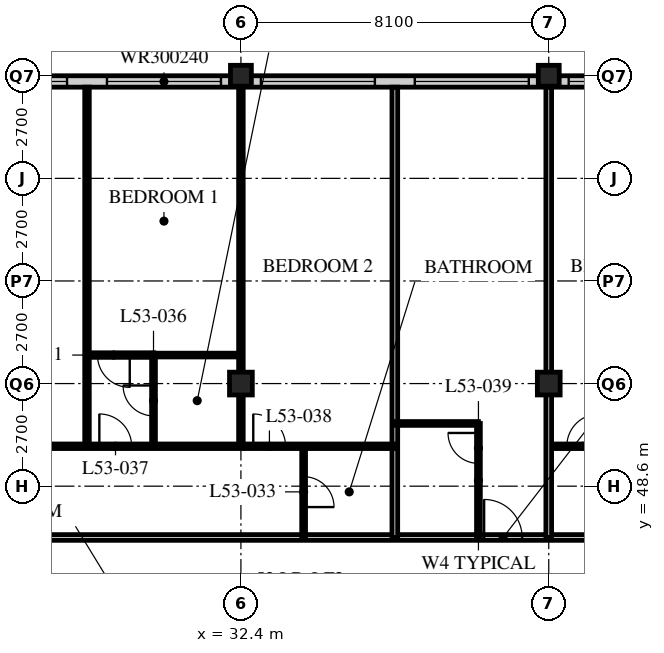
"""IFC4 building model, lengths in metres.
Left out: names, types, materials, properties, quantities, classifications, styles, units other than length and angle.
Written with IfcOpenShell. Run it as: python <this file> out.ifc"""

import sys

from ifc_helpers import new_model, si_unit, direction, frame, frame_2d, origin, origin_2d, place, context, subcontext, project, spatial, rectangle, hollow_rectangle, extrude, element, fill, save


model = new_model("IFC4")
c1 = context("Model", 3, precision=1e-05, world=origin(), true_north=direction((0.0, 1.0)))
c2 = subcontext(c1, "Body", "Model", "MODEL_VIEW")
j1 = project(units=[si_unit("LENGTHUNIT", "METRE"), si_unit("PLANEANGLEUNIT", "RADIAN")], contexts=[c1])
p1 = place(None, origin())
s1 = spatial("IfcSite", under=j1, at=p1, CompositionType="ELEMENT")
p2 = place(p1, origin())
s2 = spatial("IfcBuilding", under=s1, at=p2, CompositionType="ELEMENT")
p3 = place(p2, frame((0.0, 0.0, 206.4)))
s3 = spatial("IfcBuildingStorey", under=s2, at=p3, CompositionType="ELEMENT", Elevation=206.4)
p4 = place(p3, frame((32.4, 51.3, 0.0), z_axis=(0.0, 0.0, 1.0), x_axis=(1.0, 0.0, 0.0)))
e1 = element("IfcColumn", 1, at=p4, inside=s3, PredefinedType="COLUMN", context=c2, shape_type="SweptSolid", body=[
    extrude(hollow_rectangle(XDim=0.6, YDim=0.6, WallThickness=0.05, at=origin_2d()), origin(), (0.0, 0.0, 1.0), 3.6),
])
p5 = place(p3, frame((32.4, 59.4, 0.0), z_axis=(0.0, 0.0, 1.0), x_axis=(1.0, 0.0, 0.0)))
e2 = element("IfcColumn", 2, at=p5, inside=s3, PredefinedType="COLUMN", context=c2, shape_type="SweptSolid", body=[
    extrude(hollow_rectangle(XDim=0.55, YDim=0.55, WallThickness=0.045, at=origin_2d()), origin(), (0.0, 0.0, 1.0), 3.6),
])
p6 = place(p3, frame((40.5, 51.3, 0.0), z_axis=(0.0, 0.0, 1.0), x_axis=(1.0, 0.0, 0.0)))
e3 = element("IfcColumn", 3, at=p6, inside=s3, PredefinedType="COLUMN", context=c2, shape_type="SweptSolid", body=[
    extrude(hollow_rectangle(XDim=0.6, YDim=0.6, WallThickness=0.05, at=origin_2d()), origin(), (0.0, 0.0, 1.0), 3.6),
])
p7 = place(p3, frame((40.5, 59.4, 0.0), z_axis=(0.0, 0.0, 1.0), x_axis=(1.0, 0.0, 0.0)))
e4 = element("IfcColumn", 4, at=p7, inside=s3, PredefinedType="COLUMN", context=c2, shape_type="SweptSolid", body=[
    extrude(hollow_rectangle(XDim=0.55, YDim=0.55, WallThickness=0.045, at=origin_2d()), origin(), (0.0, 0.0, 1.0), 3.6),
])
p8 = place(p3, frame((48.3, 59.25, 0.0), z_axis=(0.0, 0.0, 1.0), x_axis=(-1.0, 0.0, 0.0)))
e5 = element("IfcWall", 5, at=p8, inside=s3, PredefinedType="SOLIDWALL", context=c2, shape_type="SweptSolid", body=[
    extrude(rectangle(XDim=40.2, YDim=0.3, at=frame_2d((20.1, 0.0))), origin(), (0.0, 0.0, 1.0), 3.39),
])
p9 = place(p8, frame((0.225, 0.0, 0.6)))
e6 = element("IfcOpeningElement", 6, at=p9, cuts=e5, PredefinedType="OPENING", context=c2, shape_type="SweptSolid", body=[
    extrude(rectangle(XDim=3.0, YDim=2.4, at=frame_2d((1.5, 1.2))), frame((0.0, 0.16, 0.0), z_axis=(0.0, -1.0, 0.0), x_axis=(1.0, 0.0, 0.0)), (0.0, 0.0, 1.0), 0.32),
])
p10 = place(p8, frame((4.275, 0.0, 0.6)))
e7 = element("IfcOpeningElement", 7, at=p10, cuts=e5, PredefinedType="OPENING", context=c2, shape_type="SweptSolid", body=[
    extrude(rectangle(XDim=3.0, YDim=2.4, at=frame_2d((1.5, 1.2))), frame((0.0, 0.16, 0.0), z_axis=(0.0, -1.0, 0.0), x_axis=(1.0, 0.0, 0.0)), (0.0, 0.0, 1.0), 0.32),
])
p11 = place(p8, frame((8.325, 0.0, 0.6)))
e8 = element("IfcOpeningElement", 8, at=p11, cuts=e5, PredefinedType="OPENING", context=c2, shape_type="SweptSolid", body=[
    extrude(rectangle(XDim=3.0, YDim=2.4, at=frame_2d((1.5, 1.2))), frame((0.0, 0.16, 0.0), z_axis=(0.0, -1.0, 0.0), x_axis=(1.0, 0.0, 0.0)), (0.0, 0.0, 1.0), 0.32),
])
p12 = place(p8, frame((12.375, 0.0, 0.6)))
e9 = element("IfcOpeningElement", 9, at=p12, cuts=e5, PredefinedType="OPENING", context=c2, shape_type="SweptSolid", body=[
    extrude(rectangle(XDim=3.0, YDim=2.4, at=frame_2d((1.5, 1.2))), frame((0.0, 0.16, 0.0), z_axis=(0.0, -1.0, 0.0), x_axis=(1.0, 0.0, 0.0)), (0.0, 0.0, 1.0), 0.32),
])
p13 = place(p8, frame((16.425, 0.0, 0.6)))
e10 = element("IfcOpeningElement", 10, at=p13, cuts=e5, PredefinedType="OPENING", context=c2, shape_type="SweptSolid", body=[
    extrude(rectangle(XDim=3.0, YDim=2.4, at=frame_2d((1.5, 1.2))), frame((0.0, 0.16, 0.0), z_axis=(0.0, -1.0, 0.0), x_axis=(1.0, 0.0, 0.0)), (0.0, 0.0, 1.0), 0.32),
])
p14 = place(p8, frame((20.475, 0.0, 0.6)))
e11 = element("IfcOpeningElement", 11, at=p14, cuts=e5, PredefinedType="OPENING", context=c2, shape_type="SweptSolid", body=[
    extrude(rectangle(XDim=3.0, YDim=2.4, at=frame_2d((1.5, 1.2))), frame((0.0, 0.16, 0.0), z_axis=(0.0, -1.0, 0.0), x_axis=(1.0, 0.0, 0.0)), (0.0, 0.0, 1.0), 0.32),
])
p15 = place(p8, frame((24.525, 0.0, 0.6)))
e12 = element("IfcOpeningElement", 12, at=p15, cuts=e5, PredefinedType="OPENING", context=c2, shape_type="SweptSolid", body=[
    extrude(rectangle(XDim=3.0, YDim=2.4, at=frame_2d((1.5, 1.2))), frame((0.0, 0.16, 0.0), z_axis=(0.0, -1.0, 0.0), x_axis=(1.0, 0.0, 0.0)), (0.0, 0.0, 1.0), 0.32),
])
p16 = place(p8, frame((28.575, 0.0, 0.6)))
e13 = element("IfcOpeningElement", 13, at=p16, cuts=e5, PredefinedType="OPENING", context=c2, shape_type="SweptSolid", body=[
    extrude(rectangle(XDim=3.0, YDim=2.4, at=frame_2d((1.5, 1.2))), frame((0.0, 0.16, 0.0), z_axis=(0.0, -1.0, 0.0), x_axis=(1.0, 0.0, 0.0)), (0.0, 0.0, 1.0), 0.32),
])
p17 = place(p8, frame((32.625, 0.0, 0.6)))
e14 = element("IfcOpeningElement", 14, at=p17, cuts=e5, PredefinedType="OPENING", context=c2, shape_type="SweptSolid", body=[
    extrude(rectangle(XDim=3.0, YDim=2.4, at=frame_2d((1.5, 1.2))), frame((0.0, 0.16, 0.0), z_axis=(0.0, -1.0, 0.0), x_axis=(1.0, 0.0, 0.0)), (0.0, 0.0, 1.0), 0.32),
])
p18 = place(p8, frame((36.675, 0.0, 0.6)))
e15 = element("IfcOpeningElement", 15, at=p18, cuts=e5, PredefinedType="OPENING", context=c2, shape_type="SweptSolid", body=[
    extrude(rectangle(XDim=3.0, YDim=2.4, at=frame_2d((1.5, 1.2))), frame((0.0, 0.16, 0.0), z_axis=(0.0, -1.0, 0.0), x_axis=(1.0, 0.0, 0.0)), (0.0, 0.0, 1.0), 0.32),
])
p19 = place(p3, frame((8.1, 47.25, 0.0), z_axis=(0.0, 0.0, 1.0), x_axis=(1.0, 0.0, 0.0)))
e16 = element("IfcWall", 16, at=p19, inside=s3, PredefinedType="PARTITIONING", context=c2, shape_type="SweptSolid", body=[
    extrude(rectangle(XDim=36.45, YDim=0.15, at=frame_2d((18.225, 0.0))), origin(), (0.0, 0.0, 1.0), 3.39),
])
p20 = place(p19, frame((4.45, 0.0, 0.0)))
e17 = element("IfcOpeningElement", 17, at=p20, cuts=e16, PredefinedType="OPENING", context=c2, shape_type="SweptSolid", body=[
    extrude(rectangle(XDim=1.0, YDim=2.1, at=frame_2d((0.5, 1.05))), frame((0.0, 0.085, 0.0), z_axis=(0.0, -1.0, 0.0), x_axis=(1.0, 0.0, 0.0)), (0.0, 0.0, 1.0), 0.17),
])
p21 = place(p19, frame((12.55, 0.0, 0.0)))
e18 = element("IfcOpeningElement", 18, at=p21, cuts=e16, PredefinedType="OPENING", context=c2, shape_type="SweptSolid", body=[
    extrude(rectangle(XDim=1.0, YDim=2.1, at=frame_2d((0.5, 1.05))), frame((0.0, 0.085, 0.0), z_axis=(0.0, -1.0, 0.0), x_axis=(1.0, 0.0, 0.0)), (0.0, 0.0, 1.0), 0.17),
])
p22 = place(p19, frame((30.7, 0.0, 0.0)))
e19 = element("IfcOpeningElement", 19, at=p22, cuts=e16, PredefinedType="OPENING", context=c2, shape_type="SweptSolid", body=[
    extrude(rectangle(XDim=1.0, YDim=2.1, at=frame_2d((0.5, 1.05))), frame((0.0, 0.085, 0.0), z_axis=(0.0, -1.0, 0.0), x_axis=(1.0, 0.0, 0.0)), (0.0, 0.0, 1.0), 0.17),
])
p23 = place(p19, frame((33.925, 0.0, 0.0)))
e20 = element("IfcOpeningElement", 20, at=p23, cuts=e16, PredefinedType="OPENING", context=c2, shape_type="SweptSolid", body=[
    extrude(rectangle(XDim=1.0, YDim=2.1, at=frame_2d((0.5, 1.05))), frame((0.0, 0.085, 0.0), z_axis=(0.0, -1.0, 0.0), x_axis=(1.0, 0.0, 0.0)), (0.0, 0.0, 1.0), 0.17),
])
p24 = place(p19, frame((1.525, 0.0, 0.0)))
e21 = element("IfcOpeningElement", 21, at=p24, cuts=e16, PredefinedType="OPENING", context=c2, shape_type="SweptSolid", body=[
    extrude(rectangle(XDim=1.0, YDim=2.1, at=frame_2d((0.5, 1.05))), frame((0.0, 0.085, 0.0), z_axis=(0.0, -1.0, 0.0), x_axis=(1.0, 0.0, 0.0)), (0.0, 0.0, 1.0), 0.17),
])
p25 = place(p3, frame((34.05, 47.25, 0.0), z_axis=(0.0, 0.0, 1.0), x_axis=(0.0, 1.0, 0.0)))
e22 = element("IfcWall", 22, at=p25, inside=s3, PredefinedType="PARTITIONING", context=c2, shape_type="SweptSolid", body=[
    extrude(rectangle(XDim=2.4, YDim=0.1, at=frame_2d((1.2, 0.0))), origin(), (0.0, 0.0, 1.0), 3.39),
])
p26 = place(p25, frame((0.8, 0.0, 0.0)))
e23 = element("IfcOpeningElement", 23, at=p26, cuts=e22, PredefinedType="OPENING", context=c2, shape_type="SweptSolid", body=[
    extrude(rectangle(XDim=0.8, YDim=2.1, at=frame_2d((0.4, 1.05))), frame((0.0, 0.06, 0.0), z_axis=(0.0, -1.0, 0.0), x_axis=(1.0, 0.0, 0.0)), (0.0, 0.0, 1.0), 0.12),
])
p27 = place(p3, frame((30.1, 49.65, 0.0), z_axis=(0.0, 0.0, 1.0), x_axis=(0.0, 1.0, 0.0)))
e24 = element("IfcWall", 24, at=p27, inside=s3, PredefinedType="PARTITIONING", context=c2, shape_type="SweptSolid", body=[
    extrude(rectangle(XDim=2.4, YDim=0.1, at=frame_2d((1.2, 0.0))), origin(), (0.0, 0.0, 1.0), 3.39),
])
p28 = place(p27, frame((0.8, 0.0, 0.0)))
e25 = element("IfcOpeningElement", 25, at=p28, cuts=e24, PredefinedType="OPENING", context=c2, shape_type="SweptSolid", body=[
    extrude(rectangle(XDim=0.8, YDim=2.1, at=frame_2d((0.4, 1.05))), frame((0.0, 0.06, 0.0), z_axis=(0.0, -1.0, 0.0), x_axis=(1.0, 0.0, 0.0)), (0.0, 0.0, 1.0), 0.12),
])
p29 = place(p3, frame((30.1, 52.05, 0.0), z_axis=(0.0, 0.0, 1.0), x_axis=(1.0, 0.0, 0.0)))
e26 = element("IfcWall", 26, at=p29, inside=s3, PredefinedType="PARTITIONING", context=c2, shape_type="SweptSolid", body=[
    extrude(rectangle(XDim=2.3, YDim=0.1, at=frame_2d((1.15, 0.0))), origin(), (0.0, 0.0, 1.0), 3.39),
])
p30 = place(p3, frame((28.35, 49.65, 0.0), z_axis=(0.0, 0.0, 1.0), x_axis=(0.0, 1.0, 0.0)))
e27 = element("IfcWall", 27, at=p30, inside=s3, PredefinedType="PARTITIONING", context=c2, shape_type="SweptSolid", body=[
    extrude(rectangle(XDim=9.45, YDim=0.12, at=frame_2d((4.725, 0.0))), origin(), (0.0, 0.0, 1.0), 3.39),
])
p31 = place(p3, frame((32.4, 49.65, 0.0), z_axis=(0.0, 0.0, 1.0), x_axis=(0.0, 1.0, 0.0)))
e28 = element("IfcWall", 28, at=p31, inside=s3, PredefinedType="PARTITIONING", context=c2, shape_type="SweptSolid", body=[
    extrude(rectangle(XDim=9.45, YDim=0.12, at=frame_2d((4.725, 0.0))), origin(), (0.0, 0.0, 1.0), 2.778),
])
p32 = place(p3, frame((36.45, 47.25, 0.0), z_axis=(0.0, 0.0, 1.0), x_axis=(0.0, 1.0, 0.0)))
e29 = element("IfcWall", 29, at=p32, inside=s3, PredefinedType="PARTITIONING", context=c2, shape_type="SweptSolid", body=[
    extrude(rectangle(XDim=11.85, YDim=0.15, at=frame_2d((5.925, 0.0))), origin(), (0.0, 0.0, 1.0), 3.39),
])
p33 = place(p3, frame((36.45, 50.25, 0.0), z_axis=(0.0, 0.0, 1.0), x_axis=(1.0, 0.0, 0.0)))
e30 = element("IfcWall", 30, at=p33, inside=s3, PredefinedType="PARTITIONING", context=c2, shape_type="SweptSolid", body=[
    extrude(rectangle(XDim=2.2, YDim=0.1, at=frame_2d((1.1, 0.0))), origin(), (0.0, 0.0, 1.0), 3.39),
])
p34 = place(p3, frame((38.65, 47.25, 0.0), z_axis=(0.0, 0.0, 1.0), x_axis=(0.0, 1.0, 0.0)))
e31 = element("IfcWall", 31, at=p34, inside=s3, PredefinedType="PARTITIONING", context=c2, shape_type="SweptSolid", body=[
    extrude(rectangle(XDim=3.0, YDim=0.1, at=frame_2d((1.5, 0.0))), origin(), (0.0, 0.0, 1.0), 3.39),
])
p35 = place(p34, frame((1.95, 0.0, 0.0)))
e32 = element("IfcOpeningElement", 32, at=p35, cuts=e31, PredefinedType="OPENING", context=c2, shape_type="SweptSolid", body=[
    extrude(rectangle(XDim=0.8, YDim=2.1, at=frame_2d((0.4, 1.05))), frame((0.0, 0.06, 0.0), z_axis=(0.0, -1.0, 0.0), x_axis=(1.0, 0.0, 0.0)), (0.0, 0.0, 1.0), 0.12),
])
p36 = place(p3, frame((40.5, 49.65, 0.0), z_axis=(0.0, 0.0, 1.0), x_axis=(1.0, 0.0, 0.0)))
e33 = element("IfcWall", 33, at=p36, inside=s3, PredefinedType="PARTITIONING", context=c2, shape_type="SweptSolid", body=[
    extrude(rectangle(XDim=8.05, YDim=0.12, at=frame_2d((4.025, 0.0))), origin(), (0.0, 0.0, 1.0), 3.39),
])
p37 = place(p36, frame((0.475, 0.0, 0.0)))
e34 = element("IfcOpeningElement", 34, at=p37, cuts=e33, PredefinedType="OPENING", context=c2, shape_type="SweptSolid", body=[
    extrude(rectangle(XDim=0.85, YDim=2.1, at=frame_2d((0.425, 1.05))), frame((0.0, 0.07, 0.0), z_axis=(0.0, -1.0, 0.0), x_axis=(1.0, 0.0, 0.0)), (0.0, 0.0, 1.0), 0.14),
])
p38 = place(p36, frame((4.325, 0.0, 0.0)))
e35 = element("IfcOpeningElement", 35, at=p38, cuts=e33, PredefinedType="OPENING", context=c2, shape_type="SweptSolid", body=[
    extrude(rectangle(XDim=0.85, YDim=2.1, at=frame_2d((0.425, 1.05))), frame((0.0, 0.07, 0.0), z_axis=(0.0, -1.0, 0.0), x_axis=(1.0, 0.0, 0.0)), (0.0, 0.0, 1.0), 0.14),
])
p39 = place(p3, frame((40.5, 47.25, 0.0), z_axis=(0.0, 0.0, 1.0), x_axis=(0.0, 1.0, 0.0)))
e36 = element("IfcWall", 36, at=p39, inside=s3, PredefinedType="PARTITIONING", context=c2, shape_type="SweptSolid", body=[
    extrude(rectangle(XDim=11.85, YDim=0.15, at=frame_2d((5.925, 0.0))), origin(), (0.0, 0.0, 1.0), 2.778),
])
p40 = place(p3, frame((4.1, 49.65, 0.0), z_axis=(0.0, 0.0, 1.0), x_axis=(1.0, 0.0, 0.0)))
e37 = element("IfcWall", 37, at=p40, inside=s3, PredefinedType="PARTITIONING", context=c2, shape_type="SweptSolid", body=[
    extrude(rectangle(XDim=32.35, YDim=0.12, at=frame_2d((16.175, 0.0))), origin(), (0.0, 0.0, 1.0), 3.39),
])
p41 = place(p40, frame((9.025, 0.0, 0.0)))
e38 = element("IfcOpeningElement", 38, at=p41, cuts=e37, PredefinedType="OPENING", context=c2, shape_type="SweptSolid", body=[
    extrude(rectangle(XDim=0.85, YDim=2.1, at=frame_2d((0.425, 1.05))), frame((0.0, 0.07, 0.0), z_axis=(0.0, -1.0, 0.0), x_axis=(1.0, 0.0, 0.0)), (0.0, 0.0, 1.0), 0.14),
])
p42 = place(p40, frame((12.425, 0.0, 0.0)))
e39 = element("IfcOpeningElement", 39, at=p42, cuts=e37, PredefinedType="OPENING", context=c2, shape_type="SweptSolid", body=[
    extrude(rectangle(XDim=0.85, YDim=2.1, at=frame_2d((0.425, 1.05))), frame((0.0, 0.07, 0.0), z_axis=(0.0, -1.0, 0.0), x_axis=(1.0, 0.0, 0.0)), (0.0, 0.0, 1.0), 0.14),
])
p43 = place(p40, frame((17.125, 0.0, 0.0)))
e40 = element("IfcOpeningElement", 40, at=p43, cuts=e37, PredefinedType="OPENING", context=c2, shape_type="SweptSolid", body=[
    extrude(rectangle(XDim=0.85, YDim=2.1, at=frame_2d((0.425, 1.05))), frame((0.0, 0.07, 0.0), z_axis=(0.0, -1.0, 0.0), x_axis=(1.0, 0.0, 0.0)), (0.0, 0.0, 1.0), 0.14),
])
p44 = place(p40, frame((24.575, 0.0, 0.0)))
e41 = element("IfcOpeningElement", 41, at=p44, cuts=e37, PredefinedType="OPENING", context=c2, shape_type="SweptSolid", body=[
    extrude(rectangle(XDim=0.85, YDim=2.1, at=frame_2d((0.425, 1.05))), frame((0.0, 0.07, 0.0), z_axis=(0.0, -1.0, 0.0), x_axis=(1.0, 0.0, 0.0)), (0.0, 0.0, 1.0), 0.14),
])
p45 = place(p40, frame((28.625, 0.0, 0.0)))
e42 = element("IfcOpeningElement", 42, at=p45, cuts=e37, PredefinedType="OPENING", context=c2, shape_type="SweptSolid", body=[
    extrude(rectangle(XDim=0.85, YDim=2.1, at=frame_2d((0.425, 1.05))), frame((0.0, 0.07, 0.0), z_axis=(0.0, -1.0, 0.0), x_axis=(1.0, 0.0, 0.0)), (0.0, 0.0, 1.0), 0.14),
])
p46 = place(p40, frame((6.725, 0.0, 0.0)))
e43 = element("IfcOpeningElement", 43, at=p46, cuts=e37, PredefinedType="OPENING", context=c2, shape_type="SweptSolid", body=[
    extrude(rectangle(XDim=0.85, YDim=2.1, at=frame_2d((0.425, 1.05))), frame((0.0, 0.07, 0.0), z_axis=(0.0, -1.0, 0.0), x_axis=(1.0, 0.0, 0.0)), (0.0, 0.0, 1.0), 0.14),
])
p47 = place(p40, frame((2.875, 0.0, 0.0)))
e44 = element("IfcOpeningElement", 44, at=p47, cuts=e37, PredefinedType="OPENING", context=c2, shape_type="SweptSolid", body=[
    extrude(rectangle(XDim=0.85, YDim=2.1, at=frame_2d((0.425, 1.05))), frame((0.0, 0.07, 0.0), z_axis=(0.0, -1.0, 0.0), x_axis=(1.0, 0.0, 0.0)), (0.0, 0.0, 1.0), 0.14),
])
p48 = place(p3, frame((28.35, 52.05, 0.0), z_axis=(0.0, 0.0, 1.0), x_axis=(1.0, 0.0, 0.0)))
e45 = element("IfcWall", 45, at=p48, inside=s3, PredefinedType="PARTITIONING", context=c2, shape_type="SweptSolid", body=[
    extrude(rectangle(XDim=1.76, YDim=0.12, at=frame_2d((0.88, 0.0))), origin(), (0.0, 0.0, 1.0), 3.39),
])
p49 = place(p48, frame((0.275, 0.0, 0.0)))
e46 = element("IfcOpeningElement", 46, at=p49, cuts=e45, PredefinedType="OPENING", context=c2, shape_type="SweptSolid", body=[
    extrude(rectangle(XDim=0.85, YDim=2.1, at=frame_2d((0.425, 1.05))), frame((0.0, 0.07, 0.0), z_axis=(0.0, -1.0, 0.0), x_axis=(1.0, 0.0, 0.0)), (0.0, 0.0, 1.0), 0.14),
])
p50 = place(p10, origin())
e47 = element("IfcWindow", 47, at=p50, inside=s3, PartitioningType="SINGLE_PANEL", PredefinedType="WINDOW", context=c2, shape_type="SweptSolid", body=[
    extrude(rectangle(XDim=3.0, YDim=2.4, at=frame_2d((1.5, 1.2))), frame((0.0, 0.03, 0.0), z_axis=(0.0, -1.0, 0.0), x_axis=(1.0, 0.0, 0.0)), (0.0, 0.0, 1.0), 0.06),
])
fill(e7, e47)
p51 = place(p11, origin())
e48 = element("IfcWindow", 48, at=p51, inside=s3, PartitioningType="SINGLE_PANEL", PredefinedType="WINDOW", context=c2, shape_type="SweptSolid", body=[
    extrude(rectangle(XDim=3.0, YDim=2.4, at=frame_2d((1.5, 1.2))), frame((0.0, 0.03, 0.0), z_axis=(0.0, -1.0, 0.0), x_axis=(1.0, 0.0, 0.0)), (0.0, 0.0, 1.0), 0.06),
])
fill(e8, e48)
p52 = place(p12, origin())
e49 = element("IfcWindow", 49, at=p52, inside=s3, PartitioningType="SINGLE_PANEL", PredefinedType="WINDOW", context=c2, shape_type="SweptSolid", body=[
    extrude(rectangle(XDim=3.0, YDim=2.4, at=frame_2d((1.5, 1.2))), frame((0.0, 0.03, 0.0), z_axis=(0.0, -1.0, 0.0), x_axis=(1.0, 0.0, 0.0)), (0.0, 0.0, 1.0), 0.06),
])
fill(e9, e49)
p53 = place(p13, origin())
e50 = element("IfcWindow", 50, at=p53, inside=s3, PartitioningType="SINGLE_PANEL", PredefinedType="WINDOW", context=c2, shape_type="SweptSolid", body=[
    extrude(rectangle(XDim=3.0, YDim=2.4, at=frame_2d((1.5, 1.2))), frame((0.0, 0.03, 0.0), z_axis=(0.0, -1.0, 0.0), x_axis=(1.0, 0.0, 0.0)), (0.0, 0.0, 1.0), 0.06),
])
fill(e10, e50)
p54 = place(p14, origin())
e51 = element("IfcWindow", 51, at=p54, inside=s3, PartitioningType="SINGLE_PANEL", PredefinedType="WINDOW", context=c2, shape_type="SweptSolid", body=[
    extrude(rectangle(XDim=3.0, YDim=2.4, at=frame_2d((1.5, 1.2))), frame((0.0, 0.03, 0.0), z_axis=(0.0, -1.0, 0.0), x_axis=(1.0, 0.0, 0.0)), (0.0, 0.0, 1.0), 0.06),
])
fill(e11, e51)
p55 = place(p26, origin())
e52 = element("IfcDoor", 52, at=p55, inside=s3, OperationType="SINGLE_SWING_RIGHT", PredefinedType="DOOR", context=c2, shape_type="SweptSolid", body=[
    extrude(rectangle(XDim=0.8, YDim=2.1, at=frame_2d((0.4, 1.05))), frame((0.0, 0.025, 0.0), z_axis=(0.0, -1.0, 0.0), x_axis=(1.0, 0.0, 0.0)), (0.0, 0.0, 1.0), 0.05),
])
fill(e23, e52)
p56 = place(p28, origin())
e53 = element("IfcDoor", 53, at=p56, inside=s3, OperationType="SINGLE_SWING_RIGHT", PredefinedType="DOOR", context=c2, shape_type="SweptSolid", body=[
    extrude(rectangle(XDim=0.8, YDim=2.1, at=frame_2d((0.4, 1.05))), frame((0.0, 0.025, 0.0), z_axis=(0.0, -1.0, 0.0), x_axis=(1.0, 0.0, 0.0)), (0.0, 0.0, 1.0), 0.05),
])
fill(e25, e53)
p57 = place(p44, origin())
e54 = element("IfcDoor", 54, at=p57, inside=s3, OperationType="SINGLE_SWING_LEFT", PredefinedType="DOOR", context=c2, shape_type="SweptSolid", body=[
    extrude(rectangle(XDim=0.85, YDim=2.1, at=frame_2d((0.425, 1.05))), frame((0.0, 0.025, 0.0), z_axis=(0.0, -1.0, 0.0), x_axis=(1.0, 0.0, 0.0)), (0.0, 0.0, 1.0), 0.05),
])
fill(e41, e54)
p58 = place(p45, origin())
e55 = element("IfcDoor", 55, at=p58, inside=s3, OperationType="SINGLE_SWING_LEFT", PredefinedType="DOOR", context=c2, shape_type="SweptSolid", body=[
    extrude(rectangle(XDim=0.85, YDim=2.1, at=frame_2d((0.425, 1.05))), frame((0.0, 0.025, 0.0), z_axis=(0.0, -1.0, 0.0), x_axis=(1.0, 0.0, 0.0)), (0.0, 0.0, 1.0), 0.05),
])
fill(e42, e55)
p59 = place(p35, origin())
e56 = element("IfcDoor", 56, at=p59, inside=s3, OperationType="SINGLE_SWING_RIGHT", PredefinedType="DOOR", context=c2, shape_type="SweptSolid", body=[
    extrude(rectangle(XDim=0.8, YDim=2.1, at=frame_2d((0.4, 1.05))), frame((0.0, 0.025, 0.0), z_axis=(0.0, -1.0, 0.0), x_axis=(1.0, 0.0, 0.0)), (0.0, 0.0, 1.0), 0.05),
])
fill(e32, e56)
p60 = place(p22, origin())
e57 = element("IfcDoor", 57, at=p60, inside=s3, OperationType="SINGLE_SWING_LEFT", PredefinedType="DOOR", context=c2, shape_type="SweptSolid", body=[
    extrude(rectangle(XDim=1.0, YDim=2.1, at=frame_2d((0.5, 1.05))), frame((0.0, 0.025, 0.0), z_axis=(0.0, -1.0, 0.0), x_axis=(1.0, 0.0, 0.0)), (0.0, 0.0, 1.0), 0.05),
])
fill(e19, e57)
p61 = place(p37, origin())
e58 = element("IfcDoor", 58, at=p61, inside=s3, OperationType="SINGLE_SWING_RIGHT", PredefinedType="DOOR", context=c2, shape_type="SweptSolid", body=[
    extrude(rectangle(XDim=0.85, YDim=2.1, at=frame_2d((0.425, 1.05))), frame((0.0, 0.025, 0.0), z_axis=(0.0, -1.0, 0.0), x_axis=(1.0, 0.0, 0.0)), (0.0, 0.0, 1.0), 0.05),
])
fill(e34, e58)
p62 = place(p49, origin())
e59 = element("IfcDoor", 59, at=p62, inside=s3, OperationType="SINGLE_SWING_LEFT", PredefinedType="DOOR", context=c2, shape_type="SweptSolid", body=[
    extrude(rectangle(XDim=0.85, YDim=2.1, at=frame_2d((0.425, 1.05))), frame((0.0, 0.025, 0.0), z_axis=(0.0, -1.0, 0.0), x_axis=(1.0, 0.0, 0.0)), (0.0, 0.0, 1.0), 0.05),
])
fill(e46, e59)
save(model, sys.argv[1])
